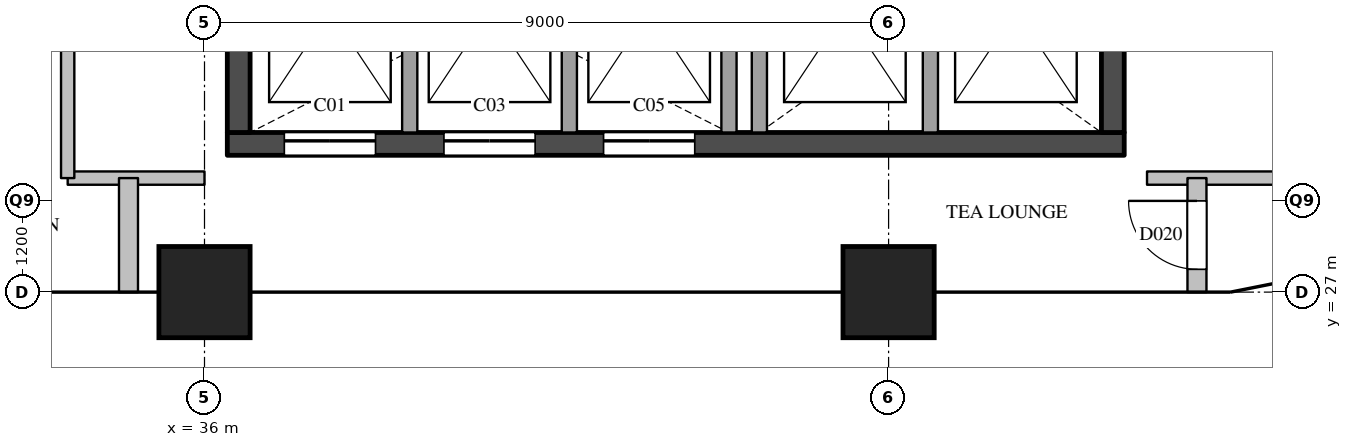
"""IFC4 building model, lengths in metres.
Left out: names, types, materials, properties, quantities, classifications, styles, units other than length and angle.
Written with IfcOpenShell. Run it as: python <this file> out.ifc"""

import sys

from ifc_helpers import new_model, si_unit, direction, frame, frame_2d, origin, origin_2d, place, context, subcontext, project, spatial, rectangle, extrude, element, fill, save


model = new_model("IFC4")
c1 = context("Model", 3, precision=1e-05, world=origin(), true_north=direction((0.0, 1.0)))
c2 = subcontext(c1, "Body", "Model", "MODEL_VIEW")
j1 = project(units=[si_unit("LENGTHUNIT", "METRE"), si_unit("PLANEANGLEUNIT", "RADIAN")], contexts=[c1])
p1 = place(None, origin())
s1 = spatial("IfcSite", under=j1, at=p1, CompositionType="ELEMENT")
p2 = place(p1, origin())
s2 = spatial("IfcBuilding", under=s1, at=p2, CompositionType="ELEMENT")
p3 = place(p2, frame((0.0, 0.0, 301.2)))
s3 = spatial("IfcBuildingStorey", under=s2, at=p3, CompositionType="ELEMENT", Elevation=301.2)
for number, where, z_axis, x_axis in (
    (1, (36.0, 27.0, 0.0), (0.0, 0.0, 1.0), (1.0, 0.0, 0.0)),
    (2, (45.0, 27.0, 0.0), (0.0, 0.0, 1.0), (1.0, 0.0, 0.0)),
):
    element("IfcColumn", number, at=place(p3, frame(where, z_axis=z_axis, x_axis=x_axis)), inside=s3, PredefinedType="COLUMN", context=c2, shape_type="SweptSolid", body=[
        extrude(rectangle(XDim=1.2, YDim=1.2, at=origin_2d()), origin(), (0.0, 0.0, 1.0), 3.9),
    ])
p4 = place(p3, frame((36.3, 28.95, 0.0), z_axis=(0.0, 0.0, 1.0), x_axis=(1.0, 0.0, 0.0)))
e3 = element("IfcWall", 3, at=p4, inside=s3, PredefinedType="SHEAR", context=c2, shape_type="SweptSolid", body=[
    extrude(rectangle(XDim=11.8, YDim=0.3, at=frame_2d((5.9, 0.0))), origin(), (0.0, 0.0, 1.0), 3.6),
])
p5 = place(p4, frame((0.75, 0.0, 0.0)))
e4 = element("IfcOpeningElement", 4, at=p5, cuts=e3, PredefinedType="OPENING", context=c2, shape_type="SweptSolid", body=[
    extrude(rectangle(XDim=1.2, YDim=2.1, at=frame_2d((0.6, 1.05))), frame((0.0, 0.16, 0.0), z_axis=(0.0, -1.0, 0.0), x_axis=(1.0, 0.0, 0.0)), (0.0, 0.0, 1.0), 0.32),
])
p6 = place(p4, frame((2.85, 0.0, 0.0)))
e5 = element("IfcOpeningElement", 5, at=p6, cuts=e3, PredefinedType="OPENING", context=c2, shape_type="SweptSolid", body=[
    extrude(rectangle(XDim=1.2, YDim=2.1, at=frame_2d((0.6, 1.05))), frame((0.0, 0.16, 0.0), z_axis=(0.0, -1.0, 0.0), x_axis=(1.0, 0.0, 0.0)), (0.0, 0.0, 1.0), 0.32),
])
p7 = place(p4, frame((4.95, 0.0, 0.0)))
e6 = element("IfcOpeningElement", 6, at=p7, cuts=e3, PredefinedType="OPENING", context=c2, shape_type="SweptSolid", body=[
    extrude(rectangle(XDim=1.2, YDim=2.1, at=frame_2d((0.6, 1.05))), frame((0.0, 0.16, 0.0), z_axis=(0.0, -1.0, 0.0), x_axis=(1.0, 0.0, 0.0)), (0.0, 0.0, 1.0), 0.32),
])
p8 = place(p3, frame((36.45, 29.1, 0.0), z_axis=(0.0, 0.0, 1.0), x_axis=(0.0, 1.0, 0.0)))
e7 = element("IfcWall", 7, at=p8, inside=s3, PredefinedType="SHEAR", context=c2, shape_type="SweptSolid", body=[
    extrude(rectangle(XDim=20.3, YDim=0.3, at=frame_2d((10.15, 0.0))), origin(), (0.0, 0.0, 1.0), 3.6),
])
p9 = place(p8, frame((3.6, 0.0, 0.0)))
e8 = element("IfcOpeningElement", 8, at=p9, cuts=e7, PredefinedType="OPENING", context=c2, shape_type="SweptSolid", body=[
    extrude(rectangle(XDim=1.8, YDim=2.1, at=frame_2d((0.9, 1.05))), frame((0.0, 0.16, 0.0), z_axis=(0.0, -1.0, 0.0), x_axis=(1.0, 0.0, 0.0)), (0.0, 0.0, 1.0), 0.32),
])
p10 = place(p8, frame((16.4, 0.0, 0.0)))
e9 = element("IfcOpeningElement", 9, at=p10, cuts=e7, PredefinedType="OPENING", context=c2, shape_type="SweptSolid", body=[
    extrude(rectangle(XDim=1.0, YDim=2.1, at=frame_2d((0.5, 1.05))), frame((0.0, 0.16, 0.0), z_axis=(0.0, -1.0, 0.0), x_axis=(1.0, 0.0, 0.0)), (0.0, 0.0, 1.0), 0.32),
])
p11 = place(p3, frame((47.95, 29.1, 0.0), z_axis=(0.0, 0.0, 1.0), x_axis=(0.0, 1.0, 0.0)))
e10 = element("IfcWall", 10, at=p11, inside=s3, PredefinedType="SHEAR", context=c2, shape_type="SweptSolid", body=[
    extrude(rectangle(XDim=20.3, YDim=0.3, at=frame_2d((10.15, 0.0))), origin(), (0.0, 0.0, 1.0), 3.6),
])
p12 = place(p11, frame((12.5, 0.0, 0.0)))
e11 = element("IfcOpeningElement", 11, at=p12, cuts=e10, PredefinedType="OPENING", context=c2, shape_type="SweptSolid", body=[
    extrude(rectangle(XDim=0.7, YDim=2.1, at=frame_2d((0.35, 1.05))), frame((0.0, 0.16, 0.0), z_axis=(0.0, -1.0, 0.0), x_axis=(1.0, 0.0, 0.0)), (0.0, 0.0, 1.0), 0.32),
])
p13 = place(p11, frame((3.9, 0.0, 0.0)))
e12 = element("IfcOpeningElement", 12, at=p13, cuts=e10, PredefinedType="OPENING", context=c2, shape_type="SweptSolid", body=[
    extrude(rectangle(XDim=1.8, YDim=2.1, at=frame_2d((0.9, 1.05))), frame((0.0, 0.16, 0.0), z_axis=(0.0, -1.0, 0.0), x_axis=(1.0, 0.0, 0.0)), (0.0, 0.0, 1.0), 0.32),
])
for number, where, z_axis, x_axis in (
    (13, (38.7, 29.1, 0.0), (0.0, 0.0, 1.0), (0.0, 1.0, 0.0)),
    (14, (40.8, 29.1, 0.0), (0.0, 0.0, 1.0), (0.0, 1.0, 0.0)),
    (15, (42.9, 29.1, 0.0), (0.0, 0.0, 1.0), (0.0, 1.0, 0.0)),
):
    element("IfcWall", number, at=place(p3, frame(where, z_axis=z_axis, x_axis=x_axis)), inside=s3, PredefinedType="SOLIDWALL", context=c2, shape_type="SweptSolid", body=[
        extrude(rectangle(XDim=3.2, YDim=0.2, at=frame_2d((1.6, 0.0))), origin(), (0.0, 0.0, 1.0), 3.6),
    ])
p14 = place(p3, frame((43.3, 29.1, 0.0), z_axis=(0.0, 0.0, 1.0), x_axis=(0.0, 1.0, 0.0)))
e16 = element("IfcWall", 16, at=p14, inside=s3, PredefinedType="SOLIDWALL", context=c2, shape_type="SweptSolid", body=[
    extrude(rectangle(XDim=9.9, YDim=0.2, at=frame_2d((4.95, 0.0))), origin(), (0.0, 0.0, 1.0), 3.6),
])
p15 = place(p3, frame((45.55, 29.1, 0.0), z_axis=(0.0, 0.0, 1.0), x_axis=(0.0, 1.0, 0.0)))
e17 = element("IfcWall", 17, at=p15, inside=s3, PredefinedType="SOLIDWALL", context=c2, shape_type="SweptSolid", body=[
    extrude(rectangle(XDim=3.2, YDim=0.2, at=frame_2d((1.6, 0.0))), origin(), (0.0, 0.0, 1.0), 3.6),
])
for number, where, z_axis, x_axis in (
    (18, (34.2, 28.5, 0.0), (0.0, 0.0, 1.0), (1.0, 0.0, 0.0)),
    (19, (48.4, 28.5, 0.0), (0.0, 0.0, 1.0), (1.0, 0.0, 0.0)),
):
    element("IfcWall", number, at=place(p3, frame(where, z_axis=z_axis, x_axis=x_axis)), inside=s3, PredefinedType="PARTITIONING", context=c2, shape_type="SweptSolid", body=[
        extrude(rectangle(XDim=1.8, YDim=0.175, at=frame_2d((0.9, 0.0))), origin(), (0.0, 0.0, 1.0), 3.6),
    ])
p16 = place(p3, frame((34.2, 28.5, 0.0), z_axis=(0.0, 0.0, 1.0), x_axis=(0.0, 1.0, 0.0)))
e20 = element("IfcWall", 20, at=p16, inside=s3, PredefinedType="PARTITIONING", context=c2, shape_type="SweptSolid", body=[
    extrude(rectangle(XDim=23.3, YDim=0.175, at=frame_2d((11.65, 0.0))), origin(), (0.0, 0.0, 1.0), 3.6),
])
p17 = place(p16, frame((15.1, 0.0, 0.0)))
e21 = element("IfcOpeningElement", 21, at=p17, cuts=e20, PredefinedType="OPENING", context=c2, shape_type="SweptSolid", body=[
    extrude(rectangle(XDim=1.0, YDim=2.1, at=frame_2d((0.5, 1.05))), frame((0.0, 0.097, 0.0), z_axis=(0.0, -1.0, 0.0), x_axis=(1.0, 0.0, 0.0)), (0.0, 0.0, 1.0), 0.195),
])
p18 = place(p16, frame((16.9, 0.0, 0.0)))
e22 = element("IfcOpeningElement", 22, at=p18, cuts=e20, PredefinedType="OPENING", context=c2, shape_type="SweptSolid", body=[
    extrude(rectangle(XDim=1.0, YDim=2.1, at=frame_2d((0.5, 1.05))), frame((0.0, 0.097, 0.0), z_axis=(0.0, -1.0, 0.0), x_axis=(1.0, 0.0, 0.0)), (0.0, 0.0, 1.0), 0.195),
])
p19 = place(p16, frame((21.9, 0.0, 0.0)))
e23 = element("IfcOpeningElement", 23, at=p19, cuts=e20, PredefinedType="OPENING", context=c2, shape_type="SweptSolid", body=[
    extrude(rectangle(XDim=1.0, YDim=2.1, at=frame_2d((0.5, 1.05))), frame((0.0, 0.097, 0.0), z_axis=(0.0, -1.0, 0.0), x_axis=(1.0, 0.0, 0.0)), (0.0, 0.0, 1.0), 0.195),
])
p20 = place(p3, frame((35.0, 27.0, 0.0), z_axis=(0.0, 0.0, 1.0), x_axis=(0.0, 1.0, 0.0)))
e24 = element("IfcWall", 24, at=p20, inside=s3, PredefinedType="PARTITIONING", context=c2, shape_type="SweptSolid", body=[
    extrude(rectangle(XDim=1.5, YDim=0.25, at=frame_2d((0.75, 0.0))), origin(), (0.0, 0.0, 1.0), 2.6),
])
p21 = place(p3, frame((49.057, 27.0, 0.0), z_axis=(0.0, 0.0, 1.0), x_axis=(0.0, 1.0, 0.0)))
e25 = element("IfcWall", 25, at=p21, inside=s3, PredefinedType="PARTITIONING", context=c2, shape_type="SweptSolid", body=[
    extrude(rectangle(XDim=1.5, YDim=0.25, at=frame_2d((0.75, 0.0))), origin(), (0.0, 0.0, 1.0), 2.6),
])
p22 = place(p21, frame((0.3, 0.0, 0.0)))
e26 = element("IfcOpeningElement", 26, at=p22, cuts=e25, PredefinedType="OPENING", context=c2, shape_type="SweptSolid", body=[
    extrude(rectangle(XDim=0.9, YDim=2.1, at=frame_2d((0.45, 1.05))), frame((0.0, 0.135, 0.0), z_axis=(0.0, -1.0, 0.0), x_axis=(1.0, 0.0, 0.0)), (0.0, 0.0, 1.0), 0.27),
])
p23 = place(p5, origin())
e27 = element("IfcDoor", 27, at=p23, inside=s3, OperationType="SLIDING_TO_LEFT", PredefinedType="DOOR", context=c2, shape_type="SweptSolid", body=[
    extrude(rectangle(XDim=1.2, YDim=2.1, at=frame_2d((0.6, 1.05))), frame((0.0, 0.025, 0.0), z_axis=(0.0, -1.0, 0.0), x_axis=(1.0, 0.0, 0.0)), (0.0, 0.0, 1.0), 0.05),
])
fill(e4, e27)
p24 = place(p6, origin())
e28 = element("IfcDoor", 28, at=p24, inside=s3, OperationType="SLIDING_TO_LEFT", PredefinedType="DOOR", context=c2, shape_type="SweptSolid", body=[
    extrude(rectangle(XDim=1.2, YDim=2.1, at=frame_2d((0.6, 1.05))), frame((0.0, 0.025, 0.0), z_axis=(0.0, -1.0, 0.0), x_axis=(1.0, 0.0, 0.0)), (0.0, 0.0, 1.0), 0.05),
])
fill(e5, e28)
p25 = place(p7, origin())
e29 = element("IfcDoor", 29, at=p25, inside=s3, OperationType="SLIDING_TO_LEFT", PredefinedType="DOOR", context=c2, shape_type="SweptSolid", body=[
    extrude(rectangle(XDim=1.2, YDim=2.1, at=frame_2d((0.6, 1.05))), frame((0.0, 0.025, 0.0), z_axis=(0.0, -1.0, 0.0), x_axis=(1.0, 0.0, 0.0)), (0.0, 0.0, 1.0), 0.05),
])
fill(e6, e29)
p26 = place(p22, origin())
e30 = element("IfcDoor", 30, at=p26, inside=s3, OperationType="SINGLE_SWING_RIGHT", PredefinedType="DOOR", context=c2, shape_type="SweptSolid", body=[
    extrude(rectangle(XDim=0.9, YDim=2.1, at=frame_2d((0.45, 1.05))), frame((0.0, 0.025, 0.0), z_axis=(0.0, -1.0, 0.0), x_axis=(1.0, 0.0, 0.0)), (0.0, 0.0, 1.0), 0.05),
])
fill(e26, e30)
save(model, sys.argv[1])
